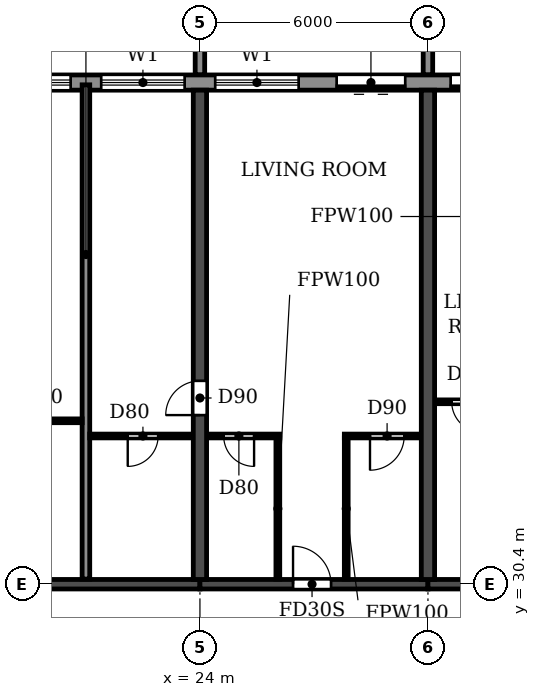
"""IFC4 building model, lengths in metres.
Left out: names, types, materials, properties, quantities, classifications, styles, units other than length and angle.
Written with IfcOpenShell. Run it as: python <this file> out.ifc"""

import sys

from ifc_helpers import new_model, si_unit, direction, frame, frame_2d, origin, place, context, subcontext, project, spatial, polyline, rectangle, outline, extrude, source, transform, mapped, element, fill, save


model = new_model("IFC4")
c1 = context("Model", 3, precision=1e-05, world=origin(), true_north=direction((0.0, 1.0)))
c2 = subcontext(c1, "Body", "Model", "MODEL_VIEW")
j1 = project(units=[si_unit("LENGTHUNIT", "METRE"), si_unit("PLANEANGLEUNIT", "RADIAN")], contexts=[c1])
p1 = place(None, origin())
s1 = spatial("IfcSite", under=j1, at=p1, CompositionType="ELEMENT")
p2 = place(p1, origin())
s2 = spatial("IfcBuilding", under=s1, at=p2, CompositionType="ELEMENT")
p3 = place(p2, frame((0.0, 0.0, 82.8)))
s3 = spatial("IfcBuildingStorey", under=s2, at=p3, CompositionType="ELEMENT", Elevation=82.8)
p4 = place(p3, frame((24.0, 30.525, 0.0), z_axis=(0.0, 0.0, 1.0), x_axis=(0.0, 1.0, 0.0)))
e1 = element("IfcWall", 1, at=p4, inside=s3, PredefinedType="SHEAR", context=c2, shape_type="SweptSolid", body=[
    extrude(rectangle(XDim=12.875, YDim=0.35, at=frame_2d((6.438, 0.0))), origin(), (0.0, 0.0, 1.0), 3.06),
])
p5 = place(p4, frame((4.325, 0.0, 0.0)))
e2 = element("IfcOpeningElement", 2, at=p5, cuts=e1, PredefinedType="OPENING", context=c2, shape_type="SweptSolid", body=[
    extrude(rectangle(XDim=0.9, YDim=2.1, at=frame_2d((0.45, 1.05))), frame((0.0, 0.185, 0.0), z_axis=(0.0, -1.0, 0.0), x_axis=(1.0, 0.0, 0.0)), (0.0, 0.0, 1.0), 0.37),
])
p6 = place(p3, frame((30.0, 30.525, 0.0), z_axis=(0.0, 0.0, 1.0), x_axis=(0.0, 1.0, 0.0)))
e3 = element("IfcWall", 3, at=p6, inside=s3, PredefinedType="SHEAR", context=c2, shape_type="SweptSolid", body=[
    extrude(rectangle(XDim=12.875, YDim=0.35, at=frame_2d((6.438, 0.0))), origin(), (0.0, 0.0, 1.0), 3.06),
])
p7 = place(p3, frame((18.0, 30.4, 0.0), z_axis=(0.0, 0.0, 1.0), x_axis=(1.0, 0.0, 0.0)))
e4 = element("IfcWall", 4, at=p7, inside=s3, PredefinedType="SHEAR", context=c2, shape_type="SweptSolid", body=[
    extrude(rectangle(XDim=6.0, YDim=0.25, at=frame_2d((3.0, 0.0))), origin(), (0.0, 0.0, 1.0), 2.46),
])
p8 = place(p3, frame((24.0, 30.4, 0.0), z_axis=(0.0, 0.0, 1.0), x_axis=(1.0, 0.0, 0.0)))
e5 = element("IfcWall", 5, at=p8, inside=s3, PredefinedType="SHEAR", context=c2, shape_type="SweptSolid", body=[
    extrude(rectangle(XDim=6.0, YDim=0.25, at=frame_2d((3.0, 0.0))), origin(), (0.0, 0.0, 1.0), 2.46),
])
p9 = place(p8, frame((2.45, 0.0, 0.0)))
e6 = element("IfcOpeningElement", 6, at=p9, cuts=e5, PredefinedType="OPENING", context=c2, shape_type="SweptSolid", body=[
    extrude(rectangle(XDim=1.0, YDim=2.1, at=frame_2d((0.5, 1.05))), frame((0.0, 0.135, 0.0), z_axis=(0.0, -1.0, 0.0), x_axis=(1.0, 0.0, 0.0)), (0.0, 0.0, 1.0), 0.27),
])
p10 = place(p3, frame((30.0, 30.4, 0.0), z_axis=(0.0, 0.0, 1.0), x_axis=(1.0, 0.0, 0.0)))
e7 = element("IfcWall", 7, at=p10, inside=s3, PredefinedType="SHEAR", context=c2, shape_type="SweptSolid", body=[
    extrude(rectangle(XDim=6.0, YDim=0.25, at=frame_2d((3.0, 0.0))), origin(), (0.0, 0.0, 1.0), 2.46),
])
p11 = place(p10, frame((2.45, 0.0, 0.0)))
e8 = element("IfcOpeningElement", 8, at=p11, cuts=e7, PredefinedType="OPENING", context=c2, shape_type="SweptSolid", body=[
    extrude(rectangle(XDim=1.0, YDim=2.1, at=frame_2d((0.5, 1.05))), frame((0.0, 0.135, 0.0), z_axis=(0.0, -1.0, 0.0), x_axis=(1.0, 0.0, 0.0)), (0.0, 0.0, 1.0), 0.27),
])
p12 = place(p3, frame((91.317, 43.6, 0.0), z_axis=(0.0, 0.0, 1.0), x_axis=(-1.0, 0.0, 0.0)))
e9 = element("IfcWall", 9, at=p12, inside=s3, PredefinedType="STANDARD", context=c2, shape_type="SweptSolid", body=[
    extrude(rectangle(XDim=80.634, YDim=0.4, at=frame_2d((40.317, 0.0))), origin(), (0.0, 0.0, 1.0), 3.06),
])
p13 = place(p12, frame((76.717, 0.0, 0.9)))
e10 = element("IfcOpeningElement", 10, at=p13, cuts=e9, PredefinedType="OPENING", context=c2, shape_type="SweptSolid", body=[
    extrude(rectangle(XDim=2.2, YDim=1.5, at=frame_2d((1.1, 0.75))), frame((0.0, 0.21, 0.0), z_axis=(0.0, -1.0, 0.0), x_axis=(1.0, 0.0, 0.0)), (0.0, 0.0, 1.0), 0.42),
])
p14 = place(p12, frame((73.917, 0.0, 0.0)))
e11 = element("IfcOpeningElement", 11, at=p14, cuts=e9, PredefinedType="OPENING", context=c2, shape_type="SweptSolid", body=[
    extrude(rectangle(XDim=1.8, YDim=2.4, at=frame_2d((0.9, 1.2))), frame((0.0, 0.21, 0.0), z_axis=(0.0, -1.0, 0.0), x_axis=(1.0, 0.0, 0.0)), (0.0, 0.0, 1.0), 0.42),
])
p15 = place(p12, frame((70.717, 0.0, 0.9)))
e12 = element("IfcOpeningElement", 12, at=p15, cuts=e9, PredefinedType="OPENING", context=c2, shape_type="SweptSolid", body=[
    extrude(rectangle(XDim=2.2, YDim=1.5, at=frame_2d((1.1, 0.75))), frame((0.0, 0.21, 0.0), z_axis=(0.0, -1.0, 0.0), x_axis=(1.0, 0.0, 0.0)), (0.0, 0.0, 1.0), 0.42),
])
p16 = place(p12, frame((67.717, 0.0, 0.9)))
e13 = element("IfcOpeningElement", 13, at=p16, cuts=e9, PredefinedType="OPENING", context=c2, shape_type="SweptSolid", body=[
    extrude(rectangle(XDim=2.2, YDim=1.5, at=frame_2d((1.1, 0.75))), frame((0.0, 0.21, 0.0), z_axis=(0.0, -1.0, 0.0), x_axis=(1.0, 0.0, 0.0)), (0.0, 0.0, 1.0), 0.42),
])
p17 = place(p12, frame((64.717, 0.0, 0.9)))
e14 = element("IfcOpeningElement", 14, at=p17, cuts=e9, PredefinedType="OPENING", context=c2, shape_type="SweptSolid", body=[
    extrude(rectangle(XDim=2.2, YDim=1.5, at=frame_2d((1.1, 0.75))), frame((0.0, 0.21, 0.0), z_axis=(0.0, -1.0, 0.0), x_axis=(1.0, 0.0, 0.0)), (0.0, 0.0, 1.0), 0.42),
])
p18 = place(p12, frame((61.917, 0.0, 0.0)))
e15 = element("IfcOpeningElement", 15, at=p18, cuts=e9, PredefinedType="OPENING", context=c2, shape_type="SweptSolid", body=[
    extrude(rectangle(XDim=1.8, YDim=2.4, at=frame_2d((0.9, 1.2))), frame((0.0, 0.21, 0.0), z_axis=(0.0, -1.0, 0.0), x_axis=(1.0, 0.0, 0.0)), (0.0, 0.0, 1.0), 0.42),
])
p19 = place(p12, frame((58.917, 0.0, 0.0)))
e16 = element("IfcOpeningElement", 16, at=p19, cuts=e9, PredefinedType="OPENING", context=c2, shape_type="SweptSolid", body=[
    extrude(rectangle(XDim=1.8, YDim=2.4, at=frame_2d((0.9, 1.2))), frame((0.0, 0.21, 0.0), z_axis=(0.0, -1.0, 0.0), x_axis=(1.0, 0.0, 0.0)), (0.0, 0.0, 1.0), 0.42),
])
p20 = place(p12, frame((55.717, 0.0, 0.9)))
e17 = element("IfcOpeningElement", 17, at=p20, cuts=e9, PredefinedType="OPENING", context=c2, shape_type="SweptSolid", body=[
    extrude(rectangle(XDim=2.2, YDim=1.5, at=frame_2d((1.1, 0.75))), frame((0.0, 0.21, 0.0), z_axis=(0.0, -1.0, 0.0), x_axis=(1.0, 0.0, 0.0)), (0.0, 0.0, 1.0), 0.42),
])
p21 = place(p12, frame((52.717, 0.0, 0.9)))
e18 = element("IfcOpeningElement", 18, at=p21, cuts=e9, PredefinedType="OPENING", context=c2, shape_type="SweptSolid", body=[
    extrude(rectangle(XDim=2.2, YDim=1.5, at=frame_2d((1.1, 0.75))), frame((0.0, 0.21, 0.0), z_axis=(0.0, -1.0, 0.0), x_axis=(1.0, 0.0, 0.0)), (0.0, 0.0, 1.0), 0.42),
])
p22 = place(p12, frame((49.917, 0.0, 0.0)))
e19 = element("IfcOpeningElement", 19, at=p22, cuts=e9, PredefinedType="OPENING", context=c2, shape_type="SweptSolid", body=[
    extrude(rectangle(XDim=1.8, YDim=2.4, at=frame_2d((0.9, 1.2))), frame((0.0, 0.21, 0.0), z_axis=(0.0, -1.0, 0.0), x_axis=(1.0, 0.0, 0.0)), (0.0, 0.0, 1.0), 0.42),
])
p23 = place(p12, frame((46.717, 0.0, 0.9)))
e20 = element("IfcOpeningElement", 20, at=p23, cuts=e9, PredefinedType="OPENING", context=c2, shape_type="SweptSolid", body=[
    extrude(rectangle(XDim=2.2, YDim=1.5, at=frame_2d((1.1, 0.75))), frame((0.0, 0.21, 0.0), z_axis=(0.0, -1.0, 0.0), x_axis=(1.0, 0.0, 0.0)), (0.0, 0.0, 1.0), 0.42),
])
p24 = place(p12, frame((43.717, 0.0, 0.9)))
e21 = element("IfcOpeningElement", 21, at=p24, cuts=e9, PredefinedType="OPENING", context=c2, shape_type="SweptSolid", body=[
    extrude(rectangle(XDim=2.2, YDim=1.5, at=frame_2d((1.1, 0.75))), frame((0.0, 0.21, 0.0), z_axis=(0.0, -1.0, 0.0), x_axis=(1.0, 0.0, 0.0)), (0.0, 0.0, 1.0), 0.42),
])
p25 = place(p12, frame((40.717, 0.0, 0.9)))
e22 = element("IfcOpeningElement", 22, at=p25, cuts=e9, PredefinedType="OPENING", context=c2, shape_type="SweptSolid", body=[
    extrude(rectangle(XDim=2.2, YDim=1.5, at=frame_2d((1.1, 0.75))), frame((0.0, 0.21, 0.0), z_axis=(0.0, -1.0, 0.0), x_axis=(1.0, 0.0, 0.0)), (0.0, 0.0, 1.0), 0.42),
])
p26 = place(p12, frame((37.917, 0.0, 0.0)))
e23 = element("IfcOpeningElement", 23, at=p26, cuts=e9, PredefinedType="OPENING", context=c2, shape_type="SweptSolid", body=[
    extrude(rectangle(XDim=1.8, YDim=2.4, at=frame_2d((0.9, 1.2))), frame((0.0, 0.21, 0.0), z_axis=(0.0, -1.0, 0.0), x_axis=(1.0, 0.0, 0.0)), (0.0, 0.0, 1.0), 0.42),
])
p27 = place(p12, frame((34.717, 0.0, 0.9)))
e24 = element("IfcOpeningElement", 24, at=p27, cuts=e9, PredefinedType="OPENING", context=c2, shape_type="SweptSolid", body=[
    extrude(rectangle(XDim=2.2, YDim=1.5, at=frame_2d((1.1, 0.75))), frame((0.0, 0.21, 0.0), z_axis=(0.0, -1.0, 0.0), x_axis=(1.0, 0.0, 0.0)), (0.0, 0.0, 1.0), 0.42),
])
p28 = place(p12, frame((31.717, 0.0, 0.9)))
e25 = element("IfcOpeningElement", 25, at=p28, cuts=e9, PredefinedType="OPENING", context=c2, shape_type="SweptSolid", body=[
    extrude(rectangle(XDim=2.2, YDim=1.5, at=frame_2d((1.1, 0.75))), frame((0.0, 0.21, 0.0), z_axis=(0.0, -1.0, 0.0), x_axis=(1.0, 0.0, 0.0)), (0.0, 0.0, 1.0), 0.42),
])
p29 = place(p12, frame((28.917, 0.0, 0.0)))
e26 = element("IfcOpeningElement", 26, at=p29, cuts=e9, PredefinedType="OPENING", context=c2, shape_type="SweptSolid", body=[
    extrude(rectangle(XDim=1.8, YDim=2.4, at=frame_2d((0.9, 1.2))), frame((0.0, 0.21, 0.0), z_axis=(0.0, -1.0, 0.0), x_axis=(1.0, 0.0, 0.0)), (0.0, 0.0, 1.0), 0.42),
])
p30 = place(p12, frame((25.717, 0.0, 0.9)))
e27 = element("IfcOpeningElement", 27, at=p30, cuts=e9, PredefinedType="OPENING", context=c2, shape_type="SweptSolid", body=[
    extrude(rectangle(XDim=2.2, YDim=1.5, at=frame_2d((1.1, 0.75))), frame((0.0, 0.21, 0.0), z_axis=(0.0, -1.0, 0.0), x_axis=(1.0, 0.0, 0.0)), (0.0, 0.0, 1.0), 0.42),
])
p31 = place(p12, frame((22.717, 0.0, 0.9)))
e28 = element("IfcOpeningElement", 28, at=p31, cuts=e9, PredefinedType="OPENING", context=c2, shape_type="SweptSolid", body=[
    extrude(rectangle(XDim=2.2, YDim=1.5, at=frame_2d((1.1, 0.75))), frame((0.0, 0.21, 0.0), z_axis=(0.0, -1.0, 0.0), x_axis=(1.0, 0.0, 0.0)), (0.0, 0.0, 1.0), 0.42),
])
p32 = place(p12, frame((19.717, 0.0, 0.9)))
e29 = element("IfcOpeningElement", 29, at=p32, cuts=e9, PredefinedType="OPENING", context=c2, shape_type="SweptSolid", body=[
    extrude(rectangle(XDim=2.2, YDim=1.5, at=frame_2d((1.1, 0.75))), frame((0.0, 0.21, 0.0), z_axis=(0.0, -1.0, 0.0), x_axis=(1.0, 0.0, 0.0)), (0.0, 0.0, 1.0), 0.42),
])
p33 = place(p12, frame((16.717, 0.0, 0.9)))
e30 = element("IfcOpeningElement", 30, at=p33, cuts=e9, PredefinedType="OPENING", context=c2, shape_type="SweptSolid", body=[
    extrude(rectangle(XDim=2.2, YDim=1.5, at=frame_2d((1.1, 0.75))), frame((0.0, 0.21, 0.0), z_axis=(0.0, -1.0, 0.0), x_axis=(1.0, 0.0, 0.0)), (0.0, 0.0, 1.0), 0.42),
])
p34 = place(p12, frame((13.917, 0.0, 0.0)))
e31 = element("IfcOpeningElement", 31, at=p34, cuts=e9, PredefinedType="OPENING", context=c2, shape_type="SweptSolid", body=[
    extrude(rectangle(XDim=1.8, YDim=2.4, at=frame_2d((0.9, 1.2))), frame((0.0, 0.21, 0.0), z_axis=(0.0, -1.0, 0.0), x_axis=(1.0, 0.0, 0.0)), (0.0, 0.0, 1.0), 0.42),
])
p35 = place(p12, frame((10.717, 0.0, 0.9)))
e32 = element("IfcOpeningElement", 32, at=p35, cuts=e9, PredefinedType="OPENING", context=c2, shape_type="SweptSolid", body=[
    extrude(rectangle(XDim=2.2, YDim=1.5, at=frame_2d((1.1, 0.75))), frame((0.0, 0.21, 0.0), z_axis=(0.0, -1.0, 0.0), x_axis=(1.0, 0.0, 0.0)), (0.0, 0.0, 1.0), 0.42),
])
p36 = place(p12, frame((7.717, 0.0, 0.9)))
e33 = element("IfcOpeningElement", 33, at=p36, cuts=e9, PredefinedType="OPENING", context=c2, shape_type="SweptSolid", body=[
    extrude(rectangle(XDim=2.2, YDim=1.5, at=frame_2d((1.1, 0.75))), frame((0.0, 0.21, 0.0), z_axis=(0.0, -1.0, 0.0), x_axis=(1.0, 0.0, 0.0)), (0.0, 0.0, 1.0), 0.42),
])
p37 = place(p12, frame((4.917, 0.0, 0.0)))
e34 = element("IfcOpeningElement", 34, at=p37, cuts=e9, PredefinedType="OPENING", context=c2, shape_type="SweptSolid", body=[
    extrude(rectangle(XDim=1.8, YDim=2.4, at=frame_2d((0.9, 1.2))), frame((0.0, 0.21, 0.0), z_axis=(0.0, -1.0, 0.0), x_axis=(1.0, 0.0, 0.0)), (0.0, 0.0, 1.0), 0.42),
])
p38 = place(p12, frame((1.717, 0.0, 0.9)))
e35 = element("IfcOpeningElement", 35, at=p38, cuts=e9, PredefinedType="OPENING", context=c2, shape_type="SweptSolid", body=[
    extrude(rectangle(XDim=2.2, YDim=1.5, at=frame_2d((1.1, 0.75))), frame((0.0, 0.21, 0.0), z_axis=(0.0, -1.0, 0.0), x_axis=(1.0, 0.0, 0.0)), (0.0, 0.0, 1.0), 0.42),
])
m1 = source(origin(), c2, "Body", "SweptSolid", [
    extrude(outline(polyline([(0.0, 0.0), (0.25, 0.0), (0.25, 3.1), (0.0, 3.1), (0.0, 0.0)])), origin(), (0.0, 0.0, 1.0), 3.1),
])
for number, where in (
    (36, (23.875, 43.8, 0.0)),
    (37, (29.875, 43.8, 0.0)),
):
    element("IfcWall", number, at=place(p3, frame(where)), inside=s3, PredefinedType="STANDARD", context=c2, shape_type="MappedRepresentation", body=[
        mapped(m1, transform((0.0, 0.0, 0.0))),
    ])
p39 = place(p3, frame((21.0, 30.535, 0.0), z_axis=(0.0, 0.0, 1.0), x_axis=(0.0, 1.0, 0.0)))
e38 = element("IfcWall", 38, at=p39, inside=s3, PredefinedType="PARTITIONING", context=c2, shape_type="SweptSolid", body=[
    extrude(rectangle(XDim=13.005, YDim=0.2, at=frame_2d((6.502, 0.0))), origin(), (0.0, 0.0, 1.0), 3.06),
])
p40 = place(p3, frame((21.1, 34.3, 0.0), z_axis=(0.0, 0.0, 1.0), x_axis=(1.0, 0.0, 0.0)))
e39 = element("IfcWall", 39, at=p40, inside=s3, PredefinedType="PARTITIONING", context=c2, shape_type="SweptSolid", body=[
    extrude(rectangle(XDim=2.715, YDim=0.1, at=frame_2d((1.357, 0.0))), origin(), (0.0, 0.0, 1.0), 3.06),
])
p41 = place(p40, frame((1.0, 0.0, 0.0)))
e40 = element("IfcOpeningElement", 40, at=p41, cuts=e39, PredefinedType="OPENING", context=c2, shape_type="SweptSolid", body=[
    extrude(rectangle(XDim=0.8, YDim=2.1, at=frame_2d((0.4, 1.05))), frame((0.0, 0.06, 0.0), z_axis=(0.0, -1.0, 0.0), x_axis=(1.0, 0.0, 0.0)), (0.0, 0.0, 1.0), 0.12),
])
p42 = place(p3, frame((24.185, 34.3, 0.0), z_axis=(0.0, 0.0, 1.0), x_axis=(1.0, 0.0, 0.0)))
e41 = element("IfcWall", 41, at=p42, inside=s3, PredefinedType="PARTITIONING", context=c2, shape_type="SweptSolid", body=[
    extrude(rectangle(XDim=1.915, YDim=0.1, at=frame_2d((0.958, 0.0))), origin(), (0.0, 0.0, 1.0), 3.06),
])
p43 = place(p42, frame((0.44, 0.0, 0.0)))
e42 = element("IfcOpeningElement", 42, at=p43, cuts=e41, PredefinedType="OPENING", context=c2, shape_type="SweptSolid", body=[
    extrude(rectangle(XDim=0.8, YDim=2.1, at=frame_2d((0.4, 1.05))), frame((0.0, 0.06, 0.0), z_axis=(0.0, -1.0, 0.0), x_axis=(1.0, 0.0, 0.0)), (0.0, 0.0, 1.0), 0.12),
])
p44 = place(p3, frame((27.8, 34.3, 0.0), z_axis=(0.0, 0.0, 1.0), x_axis=(1.0, 0.0, 0.0)))
e43 = element("IfcWall", 43, at=p44, inside=s3, PredefinedType="PARTITIONING", context=c2, shape_type="SweptSolid", body=[
    extrude(rectangle(XDim=2.015, YDim=0.1, at=frame_2d((1.007, 0.0))), origin(), (0.0, 0.0, 1.0), 3.06),
])
p45 = place(p44, frame((0.675, 0.0, 0.0)))
e44 = element("IfcOpeningElement", 44, at=p45, cuts=e43, PredefinedType="OPENING", context=c2, shape_type="SweptSolid", body=[
    extrude(rectangle(XDim=0.9, YDim=2.1, at=frame_2d((0.45, 1.05))), frame((0.0, 0.06, 0.0), z_axis=(0.0, -1.0, 0.0), x_axis=(1.0, 0.0, 0.0)), (0.0, 0.0, 1.0), 0.12),
])
p46 = place(p3, frame((18.185, 34.7, 0.0), z_axis=(0.0, 0.0, 1.0), x_axis=(1.0, 0.0, 0.0)))
e45 = element("IfcWall", 45, at=p46, inside=s3, PredefinedType="PARTITIONING", context=c2, shape_type="SweptSolid", body=[
    extrude(rectangle(XDim=2.715, YDim=0.1, at=frame_2d((1.357, 0.0))), origin(), (0.0, 0.0, 1.0), 3.06),
])
p47 = place(p46, frame((0.915, 0.0, 0.0)))
e46 = element("IfcOpeningElement", 46, at=p47, cuts=e45, PredefinedType="OPENING", context=c2, shape_type="SweptSolid", body=[
    extrude(rectangle(XDim=0.8, YDim=2.1, at=frame_2d((0.4, 1.05))), frame((0.0, 0.06, 0.0), z_axis=(0.0, -1.0, 0.0), x_axis=(1.0, 0.0, 0.0)), (0.0, 0.0, 1.0), 0.12),
])
p48 = place(p3, frame((30.185, 35.2, 0.0), z_axis=(0.0, 0.0, 1.0), x_axis=(1.0, 0.0, 0.0)))
e47 = element("IfcWall", 47, at=p48, inside=s3, PredefinedType="PARTITIONING", context=c2, shape_type="SweptSolid", body=[
    extrude(rectangle(XDim=1.915, YDim=0.1, at=frame_2d((0.958, 0.0))), origin(), (0.0, 0.0, 1.0), 3.06),
])
p49 = place(p48, frame((0.44, 0.0, 0.0)))
e48 = element("IfcOpeningElement", 48, at=p49, cuts=e47, PredefinedType="OPENING", context=c2, shape_type="SweptSolid", body=[
    extrude(rectangle(XDim=0.8, YDim=2.1, at=frame_2d((0.4, 1.05))), frame((0.0, 0.06, 0.0), z_axis=(0.0, -1.0, 0.0), x_axis=(1.0, 0.0, 0.0)), (0.0, 0.0, 1.0), 0.12),
])
for number, where, z_axis, x_axis in (
    (49, (26.05, 30.535, 0.0), (0.0, 0.0, 1.0), (0.0, 1.0, 0.0)),
    (50, (27.85, 30.535, 0.0), (0.0, 0.0, 1.0), (0.0, 1.0, 0.0)),
):
    element("IfcWall", number, at=place(p3, frame(where, z_axis=z_axis, x_axis=x_axis)), inside=s3, PredefinedType="PARTITIONING", context=c2, shape_type="SweptSolid", body=[
        extrude(rectangle(XDim=3.715, YDim=0.1, at=frame_2d((1.857, 0.0))), origin(), (0.0, 0.0, 1.0), 3.06),
    ])
p50 = place(p15, origin())
e51 = element("IfcWindow", 51, at=p50, inside=s3, PartitioningType="DOUBLE_PANEL_HORIZONTAL", PredefinedType="WINDOW", context=c2, shape_type="SweptSolid", body=[
    extrude(rectangle(XDim=2.2, YDim=1.5, at=frame_2d((1.1, 0.75))), frame((0.0, 0.03, 0.0), z_axis=(0.0, -1.0, 0.0), x_axis=(1.0, 0.0, 0.0)), (0.0, 0.0, 1.0), 0.06),
])
fill(e12, e51)
p51 = place(p16, origin())
e52 = element("IfcWindow", 52, at=p51, inside=s3, PartitioningType="DOUBLE_PANEL_HORIZONTAL", PredefinedType="WINDOW", context=c2, shape_type="SweptSolid", body=[
    extrude(rectangle(XDim=2.2, YDim=1.5, at=frame_2d((1.1, 0.75))), frame((0.0, 0.03, 0.0), z_axis=(0.0, -1.0, 0.0), x_axis=(1.0, 0.0, 0.0)), (0.0, 0.0, 1.0), 0.06),
])
fill(e13, e52)
p52 = place(p17, origin())
e53 = element("IfcWindow", 53, at=p52, inside=s3, PartitioningType="DOUBLE_PANEL_HORIZONTAL", PredefinedType="WINDOW", context=c2, shape_type="SweptSolid", body=[
    extrude(rectangle(XDim=2.2, YDim=1.5, at=frame_2d((1.1, 0.75))), frame((0.0, 0.03, 0.0), z_axis=(0.0, -1.0, 0.0), x_axis=(1.0, 0.0, 0.0)), (0.0, 0.0, 1.0), 0.06),
])
fill(e14, e53)
p53 = place(p18, origin())
e54 = element("IfcDoor", 54, at=p53, inside=s3, OperationType="DOUBLE_DOOR_SLIDING", PredefinedType="DOOR", context=c2, shape_type="SweptSolid", body=[
    extrude(rectangle(XDim=1.8, YDim=2.4, at=frame_2d((0.9, 1.2))), frame((0.0, 0.025, 0.0), z_axis=(0.0, -1.0, 0.0), x_axis=(1.0, 0.0, 0.0)), (0.0, 0.0, 1.0), 0.05),
])
fill(e15, e54)
p54 = place(p19, origin())
e55 = element("IfcDoor", 55, at=p54, inside=s3, OperationType="DOUBLE_DOOR_SLIDING", PredefinedType="DOOR", context=c2, shape_type="SweptSolid", body=[
    extrude(rectangle(XDim=1.8, YDim=2.4, at=frame_2d((0.9, 1.2))), frame((0.0, 0.025, 0.0), z_axis=(0.0, -1.0, 0.0), x_axis=(1.0, 0.0, 0.0)), (0.0, 0.0, 1.0), 0.05),
])
fill(e16, e55)
p55 = place(p41, frame((0.8, 0.0, 0.0), z_axis=(0.0, 0.0, 1.0), x_axis=(-1.0, 0.0, 0.0)))
e56 = element("IfcDoor", 56, at=p55, inside=s3, OperationType="SINGLE_SWING_RIGHT", PredefinedType="DOOR", context=c2, shape_type="SweptSolid", body=[
    extrude(rectangle(XDim=0.8, YDim=2.1, at=frame_2d((0.4, 1.05))), frame((0.0, 0.025, 0.0), z_axis=(0.0, -1.0, 0.0), x_axis=(1.0, 0.0, 0.0)), (0.0, 0.0, 1.0), 0.05),
])
fill(e40, e56)
p56 = place(p5, origin())
e57 = element("IfcDoor", 57, at=p56, inside=s3, OperationType="SINGLE_SWING_LEFT", PredefinedType="DOOR", context=c2, shape_type="SweptSolid", body=[
    extrude(rectangle(XDim=0.9, YDim=2.1, at=frame_2d((0.45, 1.05))), frame((0.0, 0.025, 0.0), z_axis=(0.0, -1.0, 0.0), x_axis=(1.0, 0.0, 0.0)), (0.0, 0.0, 1.0), 0.05),
])
fill(e2, e57)
p57 = place(p43, frame((0.8, 0.0, 0.0), z_axis=(0.0, 0.0, 1.0), x_axis=(-1.0, 0.0, 0.0)))
e58 = element("IfcDoor", 58, at=p57, inside=s3, OperationType="SINGLE_SWING_LEFT", PredefinedType="DOOR", context=c2, shape_type="SweptSolid", body=[
    extrude(rectangle(XDim=0.8, YDim=2.1, at=frame_2d((0.4, 1.05))), frame((0.0, 0.025, 0.0), z_axis=(0.0, -1.0, 0.0), x_axis=(1.0, 0.0, 0.0)), (0.0, 0.0, 1.0), 0.05),
])
fill(e42, e58)
p58 = place(p9, origin())
e59 = element("IfcDoor", 59, at=p58, inside=s3, OperationType="SINGLE_SWING_LEFT", PredefinedType="DOOR", context=c2, shape_type="SweptSolid", body=[
    extrude(rectangle(XDim=1.0, YDim=2.1, at=frame_2d((0.5, 1.05))), frame((0.0, 0.025, 0.0), z_axis=(0.0, -1.0, 0.0), x_axis=(1.0, 0.0, 0.0)), (0.0, 0.0, 1.0), 0.05),
])
fill(e6, e59)
p59 = place(p45, frame((0.9, 0.0, 0.0), z_axis=(0.0, 0.0, 1.0), x_axis=(-1.0, 0.0, 0.0)))
e60 = element("IfcDoor", 60, at=p59, inside=s3, OperationType="SINGLE_SWING_RIGHT", PredefinedType="DOOR", context=c2, shape_type="SweptSolid", body=[
    extrude(rectangle(XDim=0.9, YDim=2.1, at=frame_2d((0.45, 1.05))), frame((0.0, 0.025, 0.0), z_axis=(0.0, -1.0, 0.0), x_axis=(1.0, 0.0, 0.0)), (0.0, 0.0, 1.0), 0.05),
])
fill(e44, e60)
p60 = place(p49, frame((0.8, 0.0, 0.0), z_axis=(0.0, 0.0, 1.0), x_axis=(-1.0, 0.0, 0.0)))
e61 = element("IfcDoor", 61, at=p60, inside=s3, OperationType="SINGLE_SWING_LEFT", PredefinedType="DOOR", context=c2, shape_type="SweptSolid", body=[
    extrude(rectangle(XDim=0.8, YDim=2.1, at=frame_2d((0.4, 1.05))), frame((0.0, 0.025, 0.0), z_axis=(0.0, -1.0, 0.0), x_axis=(1.0, 0.0, 0.0)), (0.0, 0.0, 1.0), 0.05),
])
fill(e48, e61)
save(model, sys.argv[1])
